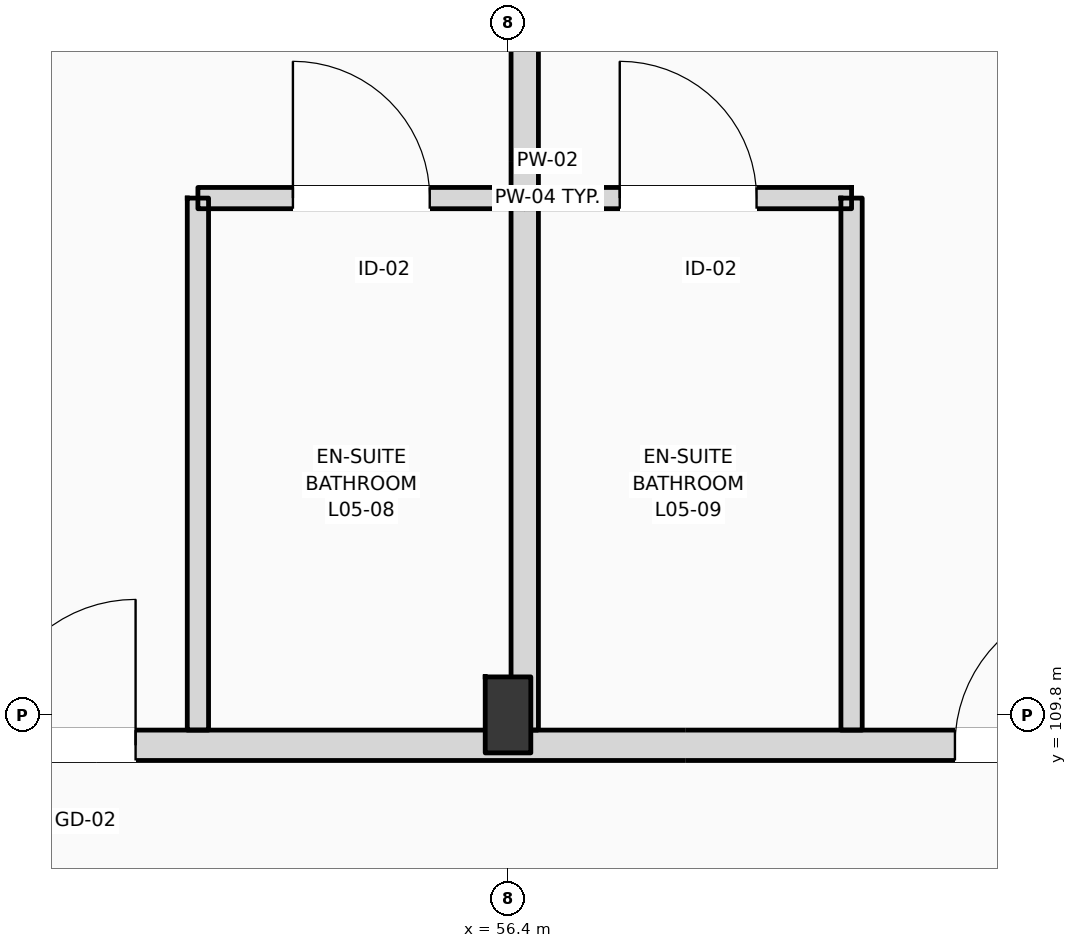
"""IFC4 building model, lengths in metres.
Left out: names, types, materials, properties, quantities, classifications, styles, units other than length and angle.
Written with IfcOpenShell. Run it as: python <this file> out.ifc"""

import sys

from ifc_helpers import new_model, si_unit, direction, frame, frame_2d, origin, origin_2d, place, context, subcontext, project, spatial, rectangle, i_section, extrude, element, fill, save


model = new_model("IFC4")
c1 = context("Model", 3, precision=1e-05, world=origin(), true_north=direction((0.0, 1.0)))
c2 = subcontext(c1, "Body", "Model", "MODEL_VIEW")
j1 = project(units=[si_unit("LENGTHUNIT", "METRE"), si_unit("PLANEANGLEUNIT", "RADIAN")], contexts=[c1])
p1 = place(None, origin())
s1 = spatial("IfcSite", under=j1, at=p1, CompositionType="ELEMENT")
p2 = place(p1, origin())
s2 = spatial("IfcBuilding", under=s1, at=p2, CompositionType="ELEMENT")
p3 = place(p2, frame((0.0, 0.0, 24.6)))
s3 = spatial("IfcBuildingStorey", under=s2, at=p3, CompositionType="ELEMENT", Elevation=24.6)
p4 = place(p3, frame((56.4, 109.8, 0.0), z_axis=(0.0, 0.0, 1.0), x_axis=(1.0, 0.0, 0.0)))
e1 = element("IfcColumn", 1, at=p4, inside=s3, PredefinedType="COLUMN", context=c2, shape_type="SweptSolid", body=[
    extrude(i_section(OverallWidth=0.3, OverallDepth=0.5, WebThickness=0.014, FlangeThickness=0.028, FilletRadius=0.027, at=origin_2d()), origin(), (0.0, 0.0, 1.0), 3.6),
])
p5 = place(p3, frame((10.65, 109.6, 0.0), z_axis=(0.0, 0.0, 1.0), x_axis=(1.0, 0.0, 0.0)))
e2 = element("IfcWall", 2, at=p5, inside=s3, PredefinedType="PARTITIONING", context=c2, shape_type="SweptSolid", body=[
    extrude(rectangle(XDim=109.21, YDim=0.2, at=frame_2d((54.605, 0.0))), origin(), (0.0, 0.0, 1.0), 2.78),
])
p6 = place(p5, frame((12.705, 0.0, 0.0)))
e3 = element("IfcOpeningElement", 3, at=p6, cuts=e2, PredefinedType="OPENING", context=c2, shape_type="SweptSolid", body=[
    extrude(rectangle(XDim=1.02, YDim=2.2, at=frame_2d((0.51, 1.1))), frame((0.0, 0.11, 0.0), z_axis=(0.0, -1.0, 0.0), x_axis=(1.0, 0.0, 0.0)), (0.0, 0.0, 1.0), 0.22),
])
p7 = place(p5, frame((19.26, 0.0, 0.0)))
e4 = element("IfcOpeningElement", 4, at=p7, cuts=e2, PredefinedType="OPENING", context=c2, shape_type="SweptSolid", body=[
    extrude(rectangle(XDim=1.02, YDim=2.2, at=frame_2d((0.51, 1.1))), frame((0.0, 0.11, 0.0), z_axis=(0.0, -1.0, 0.0), x_axis=(1.0, 0.0, 0.0)), (0.0, 0.0, 1.0), 0.22),
])
p8 = place(p5, frame((23.71, 0.0, 0.0)))
e5 = element("IfcOpeningElement", 5, at=p8, cuts=e2, PredefinedType="OPENING", context=c2, shape_type="SweptSolid", body=[
    extrude(rectangle(XDim=1.02, YDim=2.2, at=frame_2d((0.51, 1.1))), frame((0.0, 0.11, 0.0), z_axis=(0.0, -1.0, 0.0), x_axis=(1.0, 0.0, 0.0)), (0.0, 0.0, 1.0), 0.22),
])
p9 = place(p5, frame((27.66, 0.0, 0.0)))
e6 = element("IfcOpeningElement", 6, at=p9, cuts=e2, PredefinedType="OPENING", context=c2, shape_type="SweptSolid", body=[
    extrude(rectangle(XDim=1.02, YDim=2.2, at=frame_2d((0.51, 1.1))), frame((0.0, 0.11, 0.0), z_axis=(0.0, -1.0, 0.0), x_axis=(1.0, 0.0, 0.0)), (0.0, 0.0, 1.0), 0.22),
])
p10 = place(p5, frame((31.89, 0.0, 0.0)))
e7 = element("IfcOpeningElement", 7, at=p10, cuts=e2, PredefinedType="OPENING", context=c2, shape_type="SweptSolid", body=[
    extrude(rectangle(XDim=0.96, YDim=2.2, at=frame_2d((0.48, 1.1))), frame((0.0, 0.11, 0.0), z_axis=(0.0, -1.0, 0.0), x_axis=(1.0, 0.0, 0.0)), (0.0, 0.0, 1.0), 0.22),
])
p11 = place(p5, frame((33.94, 0.0, 0.0)))
e8 = element("IfcOpeningElement", 8, at=p11, cuts=e2, PredefinedType="OPENING", context=c2, shape_type="SweptSolid", body=[
    extrude(rectangle(XDim=0.96, YDim=2.2, at=frame_2d((0.48, 1.1))), frame((0.0, 0.11, 0.0), z_axis=(0.0, -1.0, 0.0), x_axis=(1.0, 0.0, 0.0)), (0.0, 0.0, 1.0), 0.22),
])
p12 = place(p5, frame((40.29, 0.0, 0.0)))
e9 = element("IfcOpeningElement", 9, at=p12, cuts=e2, PredefinedType="OPENING", context=c2, shape_type="SweptSolid", body=[
    extrude(rectangle(XDim=0.96, YDim=2.2, at=frame_2d((0.48, 1.1))), frame((0.0, 0.11, 0.0), z_axis=(0.0, -1.0, 0.0), x_axis=(1.0, 0.0, 0.0)), (0.0, 0.0, 1.0), 0.22),
])
p13 = place(p5, frame((42.34, 0.0, 0.0)))
e10 = element("IfcOpeningElement", 10, at=p13, cuts=e2, PredefinedType="OPENING", context=c2, shape_type="SweptSolid", body=[
    extrude(rectangle(XDim=0.96, YDim=2.2, at=frame_2d((0.48, 1.1))), frame((0.0, 0.11, 0.0), z_axis=(0.0, -1.0, 0.0), x_axis=(1.0, 0.0, 0.0)), (0.0, 0.0, 1.0), 0.22),
])
p14 = place(p5, frame((48.69, 0.0, 0.0)))
e11 = element("IfcOpeningElement", 11, at=p14, cuts=e2, PredefinedType="OPENING", context=c2, shape_type="SweptSolid", body=[
    extrude(rectangle(XDim=0.96, YDim=2.2, at=frame_2d((0.48, 1.1))), frame((0.0, 0.11, 0.0), z_axis=(0.0, -1.0, 0.0), x_axis=(1.0, 0.0, 0.0)), (0.0, 0.0, 1.0), 0.22),
])
p15 = place(p5, frame((50.74, 0.0, 0.0)))
e12 = element("IfcOpeningElement", 12, at=p15, cuts=e2, PredefinedType="OPENING", context=c2, shape_type="SweptSolid", body=[
    extrude(rectangle(XDim=0.96, YDim=2.2, at=frame_2d((0.48, 1.1))), frame((0.0, 0.11, 0.0), z_axis=(0.0, -1.0, 0.0), x_axis=(1.0, 0.0, 0.0)), (0.0, 0.0, 1.0), 0.22),
])
p16 = place(p5, frame((57.09, 0.0, 0.0)))
e13 = element("IfcOpeningElement", 13, at=p16, cuts=e2, PredefinedType="OPENING", context=c2, shape_type="SweptSolid", body=[
    extrude(rectangle(XDim=0.96, YDim=2.2, at=frame_2d((0.48, 1.1))), frame((0.0, 0.11, 0.0), z_axis=(0.0, -1.0, 0.0), x_axis=(1.0, 0.0, 0.0)), (0.0, 0.0, 1.0), 0.22),
])
p17 = place(p5, frame((59.14, 0.0, 0.0)))
e14 = element("IfcOpeningElement", 14, at=p17, cuts=e2, PredefinedType="OPENING", context=c2, shape_type="SweptSolid", body=[
    extrude(rectangle(XDim=0.96, YDim=2.2, at=frame_2d((0.48, 1.1))), frame((0.0, 0.11, 0.0), z_axis=(0.0, -1.0, 0.0), x_axis=(1.0, 0.0, 0.0)), (0.0, 0.0, 1.0), 0.22),
])
p18 = place(p5, frame((65.49, 0.0, 0.0)))
e15 = element("IfcOpeningElement", 15, at=p18, cuts=e2, PredefinedType="OPENING", context=c2, shape_type="SweptSolid", body=[
    extrude(rectangle(XDim=0.96, YDim=2.2, at=frame_2d((0.48, 1.1))), frame((0.0, 0.11, 0.0), z_axis=(0.0, -1.0, 0.0), x_axis=(1.0, 0.0, 0.0)), (0.0, 0.0, 1.0), 0.22),
])
p19 = place(p5, frame((67.54, 0.0, 0.0)))
e16 = element("IfcOpeningElement", 16, at=p19, cuts=e2, PredefinedType="OPENING", context=c2, shape_type="SweptSolid", body=[
    extrude(rectangle(XDim=0.96, YDim=2.2, at=frame_2d((0.48, 1.1))), frame((0.0, 0.11, 0.0), z_axis=(0.0, -1.0, 0.0), x_axis=(1.0, 0.0, 0.0)), (0.0, 0.0, 1.0), 0.22),
])
p20 = place(p5, frame((73.89, 0.0, 0.0)))
e17 = element("IfcOpeningElement", 17, at=p20, cuts=e2, PredefinedType="OPENING", context=c2, shape_type="SweptSolid", body=[
    extrude(rectangle(XDim=0.96, YDim=2.2, at=frame_2d((0.48, 1.1))), frame((0.0, 0.11, 0.0), z_axis=(0.0, -1.0, 0.0), x_axis=(1.0, 0.0, 0.0)), (0.0, 0.0, 1.0), 0.22),
])
p21 = place(p5, frame((78.09, 0.0, 0.0)))
e18 = element("IfcOpeningElement", 18, at=p21, cuts=e2, PredefinedType="OPENING", context=c2, shape_type="SweptSolid", body=[
    extrude(rectangle(XDim=0.96, YDim=2.2, at=frame_2d((0.48, 1.1))), frame((0.0, 0.11, 0.0), z_axis=(0.0, -1.0, 0.0), x_axis=(1.0, 0.0, 0.0)), (0.0, 0.0, 1.0), 0.22),
])
p22 = place(p5, frame((82.29, 0.0, 0.0)))
e19 = element("IfcOpeningElement", 19, at=p22, cuts=e2, PredefinedType="OPENING", context=c2, shape_type="SweptSolid", body=[
    extrude(rectangle(XDim=0.96, YDim=2.2, at=frame_2d((0.48, 1.1))), frame((0.0, 0.11, 0.0), z_axis=(0.0, -1.0, 0.0), x_axis=(1.0, 0.0, 0.0)), (0.0, 0.0, 1.0), 0.22),
])
p23 = place(p5, frame((86.49, 0.0, 0.0)))
e20 = element("IfcOpeningElement", 20, at=p23, cuts=e2, PredefinedType="OPENING", context=c2, shape_type="SweptSolid", body=[
    extrude(rectangle(XDim=0.96, YDim=2.2, at=frame_2d((0.48, 1.1))), frame((0.0, 0.11, 0.0), z_axis=(0.0, -1.0, 0.0), x_axis=(1.0, 0.0, 0.0)), (0.0, 0.0, 1.0), 0.22),
])
p24 = place(p5, frame((88.54, 0.0, 0.0)))
e21 = element("IfcOpeningElement", 21, at=p24, cuts=e2, PredefinedType="OPENING", context=c2, shape_type="SweptSolid", body=[
    extrude(rectangle(XDim=0.96, YDim=2.2, at=frame_2d((0.48, 1.1))), frame((0.0, 0.11, 0.0), z_axis=(0.0, -1.0, 0.0), x_axis=(1.0, 0.0, 0.0)), (0.0, 0.0, 1.0), 0.22),
])
p25 = place(p5, frame((94.89, 0.0, 0.0)))
e22 = element("IfcOpeningElement", 22, at=p25, cuts=e2, PredefinedType="OPENING", context=c2, shape_type="SweptSolid", body=[
    extrude(rectangle(XDim=0.96, YDim=2.2, at=frame_2d((0.48, 1.1))), frame((0.0, 0.11, 0.0), z_axis=(0.0, -1.0, 0.0), x_axis=(1.0, 0.0, 0.0)), (0.0, 0.0, 1.0), 0.22),
])
p26 = place(p5, frame((96.94, 0.0, 0.0)))
e23 = element("IfcOpeningElement", 23, at=p26, cuts=e2, PredefinedType="OPENING", context=c2, shape_type="SweptSolid", body=[
    extrude(rectangle(XDim=0.96, YDim=2.2, at=frame_2d((0.48, 1.1))), frame((0.0, 0.11, 0.0), z_axis=(0.0, -1.0, 0.0), x_axis=(1.0, 0.0, 0.0)), (0.0, 0.0, 1.0), 0.22),
])
p27 = place(p5, frame((103.29, 0.0, 0.0)))
e24 = element("IfcOpeningElement", 24, at=p27, cuts=e2, PredefinedType="OPENING", context=c2, shape_type="SweptSolid", body=[
    extrude(rectangle(XDim=0.96, YDim=2.2, at=frame_2d((0.48, 1.1))), frame((0.0, 0.11, 0.0), z_axis=(0.0, -1.0, 0.0), x_axis=(1.0, 0.0, 0.0)), (0.0, 0.0, 1.0), 0.22),
])
p28 = place(p5, frame((105.25, 0.0, 0.0)))
e25 = element("IfcOpeningElement", 25, at=p28, cuts=e2, PredefinedType="OPENING", context=c2, shape_type="SweptSolid", body=[
    extrude(rectangle(XDim=0.96, YDim=2.2, at=frame_2d((0.48, 1.1))), frame((0.0, 0.11, 0.0), z_axis=(0.0, -1.0, 0.0), x_axis=(1.0, 0.0, 0.0)), (0.0, 0.0, 1.0), 0.22),
])
p29 = place(p5, frame((2.716, 0.0, 0.0)))
e26 = element("IfcOpeningElement", 26, at=p29, cuts=e2, PredefinedType="OPENING", context=c2, shape_type="SweptSolid", body=[
    extrude(rectangle(XDim=1.35, YDim=2.25, at=frame_2d((0.675, 1.125))), frame((0.0, 0.11, 0.0), z_axis=(0.0, -1.0, 0.0), x_axis=(1.0, 0.0, 0.0)), (0.0, 0.0, 1.0), 0.22),
])
p30 = place(p5, frame((6.65, 0.0, 0.0)))
e27 = element("IfcOpeningElement", 27, at=p30, cuts=e2, PredefinedType="OPENING", context=c2, shape_type="SweptSolid", body=[
    extrude(rectangle(XDim=1.35, YDim=2.25, at=frame_2d((0.675, 1.125))), frame((0.0, 0.11, 0.0), z_axis=(0.0, -1.0, 0.0), x_axis=(1.0, 0.0, 0.0)), (0.0, 0.0, 1.0), 0.22),
])
p31 = place(p5, frame((10.583, 0.0, 0.0)))
e28 = element("IfcOpeningElement", 28, at=p31, cuts=e2, PredefinedType="OPENING", context=c2, shape_type="SweptSolid", body=[
    extrude(rectangle(XDim=1.35, YDim=2.25, at=frame_2d((0.675, 1.125))), frame((0.0, 0.11, 0.0), z_axis=(0.0, -1.0, 0.0), x_axis=(1.0, 0.0, 0.0)), (0.0, 0.0, 1.0), 0.22),
])
p32 = place(p3, frame((56.51, 109.7, 0.0), z_axis=(0.0, 0.0, 1.0), x_axis=(0.0, 1.0, 0.0)))
e29 = element("IfcWall", 29, at=p32, inside=s3, PredefinedType="PARTITIONING", context=c2, shape_type="SweptSolid", body=[
    extrude(rectangle(XDim=8.15, YDim=0.18, at=frame_2d((4.075, 0.0))), origin(), (0.0, 0.0, 1.0), 2.93),
])
p33 = place(p3, frame((54.36, 109.7, 0.0), z_axis=(0.0, 0.0, 1.0), x_axis=(0.0, 1.0, 0.0)))
e30 = element("IfcWall", 30, at=p33, inside=s3, PredefinedType="PARTITIONING", context=c2, shape_type="SweptSolid", body=[
    extrude(rectangle(XDim=3.5, YDim=0.14, at=frame_2d((1.75, 0.0))), origin(), (0.0, 0.0, 1.0), 3.34),
])
p34 = place(p3, frame((54.36, 113.2, 0.0), z_axis=(0.0, 0.0, 1.0), x_axis=(1.0, 0.0, 0.0)))
e31 = element("IfcWall", 31, at=p34, inside=s3, PredefinedType="PARTITIONING", context=c2, shape_type="SweptSolid", body=[
    extrude(rectangle(XDim=2.15, YDim=0.14, at=frame_2d((1.075, 0.0))), origin(), (0.0, 0.0, 1.0), 3.34),
])
p35 = place(p34, frame((0.625, 0.0, 0.0)))
e32 = element("IfcOpeningElement", 32, at=p35, cuts=e31, PredefinedType="OPENING", context=c2, shape_type="SweptSolid", body=[
    extrude(rectangle(XDim=0.9, YDim=2.1, at=frame_2d((0.45, 1.05))), frame((0.0, 0.08, 0.0), z_axis=(0.0, -1.0, 0.0), x_axis=(1.0, 0.0, 0.0)), (0.0, 0.0, 1.0), 0.16),
])
p36 = place(p3, frame((58.66, 109.7, 0.0), z_axis=(0.0, 0.0, 1.0), x_axis=(0.0, 1.0, 0.0)))
e33 = element("IfcWall", 33, at=p36, inside=s3, PredefinedType="PARTITIONING", context=c2, shape_type="SweptSolid", body=[
    extrude(rectangle(XDim=3.5, YDim=0.14, at=frame_2d((1.75, 0.0))), origin(), (0.0, 0.0, 1.0), 3.34),
])
p37 = place(p3, frame((56.51, 113.2, 0.0), z_axis=(0.0, 0.0, 1.0), x_axis=(1.0, 0.0, 0.0)))
e34 = element("IfcWall", 34, at=p37, inside=s3, PredefinedType="PARTITIONING", context=c2, shape_type="SweptSolid", body=[
    extrude(rectangle(XDim=2.15, YDim=0.14, at=frame_2d((1.075, 0.0))), origin(), (0.0, 0.0, 1.0), 3.34),
])
p38 = place(p37, frame((0.625, 0.0, 0.0)))
e35 = element("IfcOpeningElement", 35, at=p38, cuts=e34, PredefinedType="OPENING", context=c2, shape_type="SweptSolid", body=[
    extrude(rectangle(XDim=0.9, YDim=2.1, at=frame_2d((0.45, 1.05))), frame((0.0, 0.08, 0.0), z_axis=(0.0, -1.0, 0.0), x_axis=(1.0, 0.0, 0.0)), (0.0, 0.0, 1.0), 0.16),
])
p39 = place(p13, origin())
e36 = element("IfcDoor", 36, at=p39, inside=s3, OperationType="SINGLE_SWING_RIGHT", PredefinedType="DOOR", context=c2, shape_type="SweptSolid", body=[
    extrude(rectangle(XDim=0.96, YDim=2.2, at=frame_2d((0.48, 1.1))), frame((0.0, 0.025, 0.0), z_axis=(0.0, -1.0, 0.0), x_axis=(1.0, 0.0, 0.0)), (0.0, 0.0, 1.0), 0.05),
])
fill(e10, e36)
p40 = place(p35, origin())
e37 = element("IfcDoor", 37, at=p40, inside=s3, OperationType="SINGLE_SWING_LEFT", PredefinedType="DOOR", context=c2, shape_type="SweptSolid", body=[
    extrude(rectangle(XDim=0.9, YDim=2.1, at=frame_2d((0.45, 1.05))), frame((0.0, 0.025, 0.0), z_axis=(0.0, -1.0, 0.0), x_axis=(1.0, 0.0, 0.0)), (0.0, 0.0, 1.0), 0.05),
])
fill(e32, e37)
p41 = place(p14, origin())
e38 = element("IfcDoor", 38, at=p41, inside=s3, OperationType="SINGLE_SWING_RIGHT", PredefinedType="DOOR", context=c2, shape_type="SweptSolid", body=[
    extrude(rectangle(XDim=0.96, YDim=2.2, at=frame_2d((0.48, 1.1))), frame((0.0, 0.025, 0.0), z_axis=(0.0, -1.0, 0.0), x_axis=(1.0, 0.0, 0.0)), (0.0, 0.0, 1.0), 0.05),
])
fill(e11, e38)
p42 = place(p38, origin())
e39 = element("IfcDoor", 39, at=p42, inside=s3, OperationType="SINGLE_SWING_LEFT", PredefinedType="DOOR", context=c2, shape_type="SweptSolid", body=[
    extrude(rectangle(XDim=0.9, YDim=2.1, at=frame_2d((0.45, 1.05))), frame((0.0, 0.025, 0.0), z_axis=(0.0, -1.0, 0.0), x_axis=(1.0, 0.0, 0.0)), (0.0, 0.0, 1.0), 0.05),
])
fill(e35, e39)
save(model, sys.argv[1])
